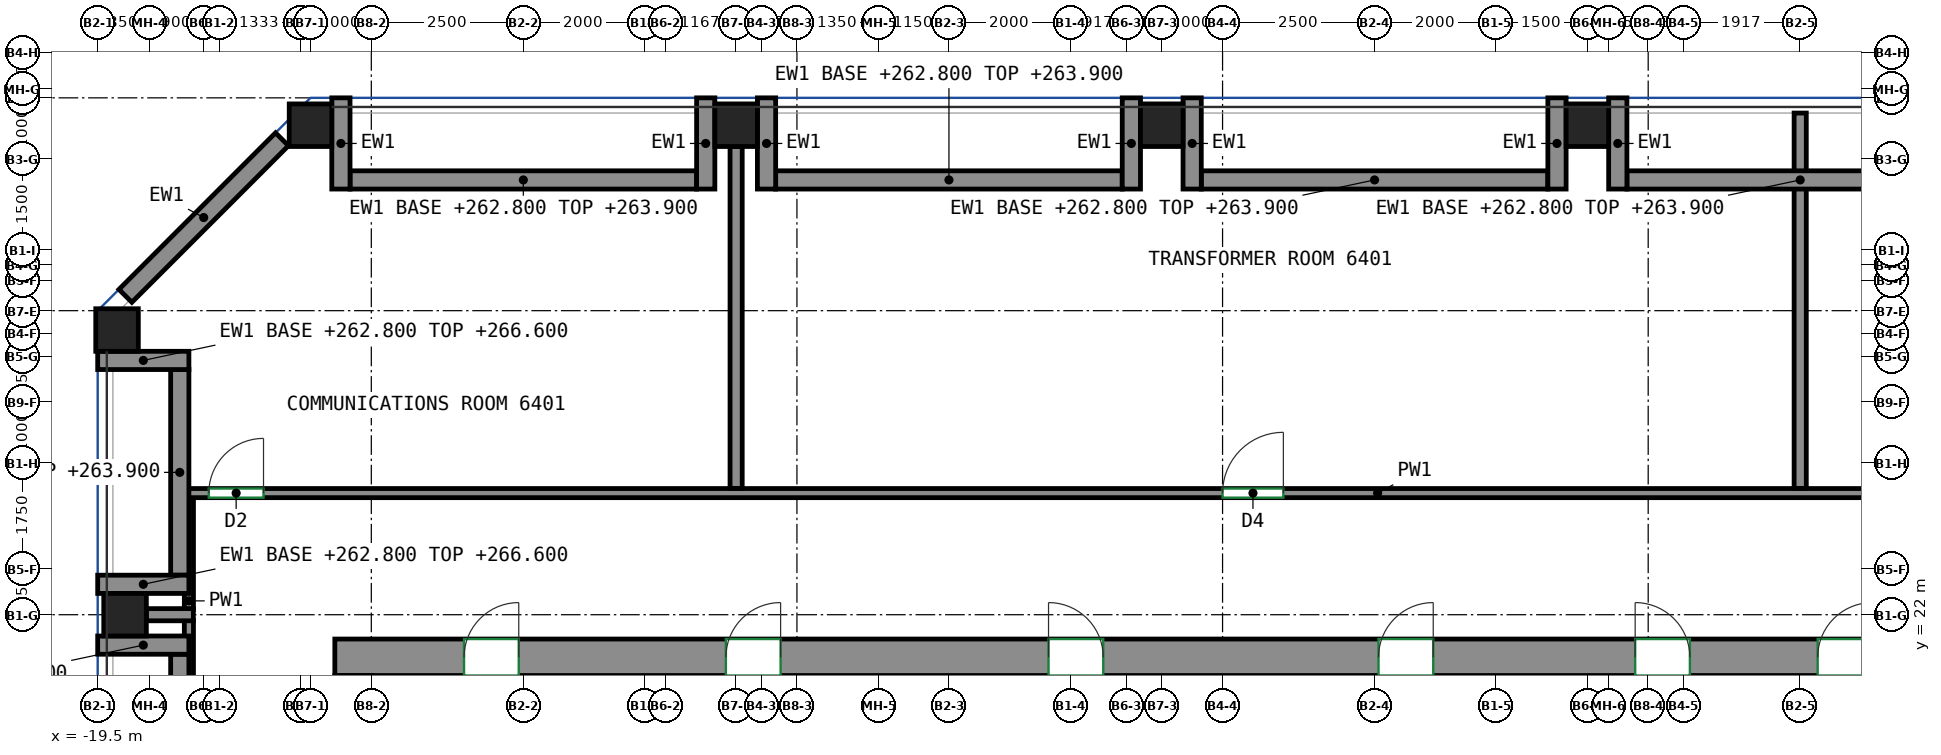
"""IFC4 building model, lengths in metres.
Left out: names, types, materials, properties, quantities, classifications, styles, units other than length and angle.
Written with IfcOpenShell. Run it as: python <this file> out.ifc"""

import sys

from ifc_helpers import new_model, si_unit, direction, frame, frame_2d, origin, origin_2d, place, context, subcontext, project, spatial, rectangle, extrude, source, transform, mapped, element, fill, save


model = new_model("IFC4")
c1 = context("Model", 3, precision=1e-05, world=origin(), true_north=direction((0.0, 1.0)))
c2 = subcontext(c1, "Body", "Model", "MODEL_VIEW")
j1 = project(units=[si_unit("LENGTHUNIT", "METRE"), si_unit("PLANEANGLEUNIT", "RADIAN")], contexts=[c1])
p1 = place(None, origin())
s1 = spatial("IfcSite", under=j1, at=p1, CompositionType="ELEMENT")
p2 = place(p1, origin())
s2 = spatial("IfcBuilding", under=s1, at=p2, CompositionType="ELEMENT")
p3 = place(p2, frame((0.0, 0.0, 262.8)))
s3 = spatial("IfcBuildingStorey", under=s2, at=p3, CompositionType="ELEMENT", Elevation=262.8)
m1 = source(origin(), c2, "Body", "SweptSolid", [
    extrude(rectangle(XDim=0.7, YDim=0.7, at=origin_2d()), origin(), (0.0, 0.0, 1.0), 3.8),
])
for number, where, z_axis, x_axis in (
    (1, (-19.182, 26.682, 0.0), (0.0, 0.0, 1.0), (1.0, 0.0, 0.0)),
    (2, (-19.05, 22.0, 0.0), (0.0, 0.0, 1.0), (1.0, 0.0, 0.0)),
):
    element("IfcColumn", number, at=place(p3, frame(where, z_axis=z_axis, x_axis=x_axis)), inside=s3, PredefinedType="COLUMN", context=c2, shape_type="MappedRepresentation", body=[
        mapped(m1, transform((0.0, 0.0, 0.0))),
    ])
m2 = source(origin(), c2, "Body", "SweptSolid", [
    extrude(rectangle(XDim=0.7, YDim=0.7, at=origin_2d()), origin(), (0.0, 0.0, 1.0), 2.3),
])
for number, where, z_axis, x_axis in (
    (3, (-16.0, 30.05, 0.0), (0.0, 0.0, 1.0), (1.0, 0.0, 0.0)),
    (4, (-9.0, 30.05, 0.0), (0.0, 0.0, 1.0), (1.0, 0.0, 0.0)),
    (5, (-2.0, 30.05, 0.0), (0.0, 0.0, 1.0), (1.0, 0.0, 0.0)),
    (6, (5.0, 30.05, 0.0), (0.0, 0.0, 1.0), (1.0, 0.0, 0.0)),
):
    element("IfcColumn", number, at=place(p3, frame(where, z_axis=z_axis, x_axis=x_axis)), inside=s3, PredefinedType="COLUMN", context=c2, shape_type="MappedRepresentation", body=[
        mapped(m2, transform((0.0, 0.0, 0.0))),
    ])
m3 = source(origin(), c2, "Body", "SweptSolid", [
    extrude(rectangle(XDim=33.3, YDim=0.6, at=frame_2d((16.65, 0.0))), origin(), (0.0, 0.0, 1.0), 3.8),
])
p4 = place(p3, frame((-15.6, 21.3, 0.0), z_axis=(0.0, 0.0, 1.0), x_axis=(1.0, 0.0, 0.0)))
e7 = element("IfcWall", 7, at=p4, inside=s3, PredefinedType="SHEAR", context=c2, shape_type="MappedRepresentation", body=[
    mapped(m3, transform((0.0, 0.0, 0.0))),
])
p5 = place(p4, frame((6.431, 0.0, 0.0)))
e8 = element("IfcOpeningElement", 8, at=p5, cuts=e7, PredefinedType="OPENING", context=c2, shape_type="SweptSolid", body=[
    extrude(rectangle(XDim=0.9, YDim=2.1, at=frame_2d((0.45, 1.05))), frame((0.0, 0.31, 0.0), z_axis=(0.0, -1.0, 0.0), x_axis=(1.0, 0.0, 0.0)), (0.0, 0.0, 1.0), 0.62),
])
p6 = place(p4, frame((11.738, 0.0, 0.0)))
e9 = element("IfcOpeningElement", 9, at=p6, cuts=e7, PredefinedType="OPENING", context=c2, shape_type="SweptSolid", body=[
    extrude(rectangle(XDim=0.9, YDim=2.1, at=frame_2d((0.45, 1.05))), frame((0.0, 0.31, 0.0), z_axis=(0.0, -1.0, 0.0), x_axis=(1.0, 0.0, 0.0)), (0.0, 0.0, 1.0), 0.62),
])
p7 = place(p4, frame((17.165, 0.0, 0.0)))
e10 = element("IfcOpeningElement", 10, at=p7, cuts=e7, PredefinedType="OPENING", context=c2, shape_type="SweptSolid", body=[
    extrude(rectangle(XDim=0.9, YDim=2.1, at=frame_2d((0.45, 1.05))), frame((0.0, 0.31, 0.0), z_axis=(0.0, -1.0, 0.0), x_axis=(1.0, 0.0, 0.0)), (0.0, 0.0, 1.0), 0.62),
])
p8 = place(p4, frame((21.386, 0.0, 0.0)))
e11 = element("IfcOpeningElement", 11, at=p8, cuts=e7, PredefinedType="OPENING", context=c2, shape_type="SweptSolid", body=[
    extrude(rectangle(XDim=0.9, YDim=2.1, at=frame_2d((0.45, 1.05))), frame((0.0, 0.31, 0.0), z_axis=(0.0, -1.0, 0.0), x_axis=(1.0, 0.0, 0.0)), (0.0, 0.0, 1.0), 0.62),
])
p9 = place(p4, frame((24.387, 0.0, 0.0)))
e12 = element("IfcOpeningElement", 12, at=p9, cuts=e7, PredefinedType="OPENING", context=c2, shape_type="SweptSolid", body=[
    extrude(rectangle(XDim=0.9, YDim=2.1, at=frame_2d((0.45, 1.05))), frame((0.0, 0.31, 0.0), z_axis=(0.0, -1.0, 0.0), x_axis=(1.0, 0.0, 0.0)), (0.0, 0.0, 1.0), 0.62),
])
p10 = place(p4, frame((26.92, 0.0, 0.0)))
e13 = element("IfcOpeningElement", 13, at=p10, cuts=e7, PredefinedType="OPENING", context=c2, shape_type="SweptSolid", body=[
    extrude(rectangle(XDim=0.9, YDim=2.1, at=frame_2d((0.45, 1.05))), frame((0.0, 0.31, 0.0), z_axis=(0.0, -1.0, 0.0), x_axis=(1.0, 0.0, 0.0)), (0.0, 0.0, 1.0), 0.62),
])
p11 = place(p4, frame((2.125, 0.0, 0.0)))
e14 = element("IfcOpeningElement", 14, at=p11, cuts=e7, PredefinedType="OPENING", context=c2, shape_type="SweptSolid", body=[
    extrude(rectangle(XDim=0.9, YDim=2.1, at=frame_2d((0.45, 1.05))), frame((0.0, 0.31, 0.0), z_axis=(0.0, -1.0, 0.0), x_axis=(1.0, 0.0, 0.0)), (0.0, 0.0, 1.0), 0.62),
])
p12 = place(p4, frame((30.275, 0.0, 0.0)))
e15 = element("IfcOpeningElement", 15, at=p12, cuts=e7, PredefinedType="OPENING", context=c2, shape_type="SweptSolid", body=[
    extrude(rectangle(XDim=0.9, YDim=2.1, at=frame_2d((0.45, 1.05))), frame((0.0, 0.31, 0.0), z_axis=(0.0, -1.0, 0.0), x_axis=(1.0, 0.0, 0.0)), (0.0, 0.0, 1.0), 0.62),
])
m4 = source(origin(), c2, "Body", "SweptSolid", [
    extrude(rectangle(XDim=5.7, YDim=0.3, at=frame_2d((2.85, 0.0))), origin(), (0.0, 0.0, 1.0), 1.1),
])
p13 = place(p3, frame((11.35, 29.15, 0.0), z_axis=(0.0, 0.0, 1.0), x_axis=(-1.0, 0.0, 0.0)))
e16 = element("IfcWall", 16, at=p13, inside=s3, PredefinedType="SOLIDWALL", context=c2, shape_type="MappedRepresentation", body=[
    mapped(m4, transform((0.0, 0.0, 0.0))),
])
m5 = source(origin(), c2, "Body", "SweptSolid", [
    extrude(rectangle(XDim=1.5, YDim=0.3, at=frame_2d((0.75, 0.0))), origin(), (0.0, 0.0, 1.0), 2.3),
])
p14 = place(p3, frame((5.5, 30.5, 0.0), z_axis=(0.0, 0.0, 1.0), x_axis=(0.0, -1.0, 0.0)))
e17 = element("IfcWall", 17, at=p14, inside=s3, PredefinedType="SOLIDWALL", context=c2, shape_type="MappedRepresentation", body=[
    mapped(m5, transform((0.0, 0.0, 0.0))),
])
p15 = place(p3, frame((4.35, 29.15, 0.0), z_axis=(0.0, 0.0, 1.0), x_axis=(-1.0, 0.0, 0.0)))
e18 = element("IfcWall", 18, at=p15, inside=s3, PredefinedType="SOLIDWALL", context=c2, shape_type="MappedRepresentation", body=[
    mapped(m4, transform((0.0, 0.0, 0.0))),
])
for number, where, z_axis, x_axis in (
    (19, (4.5, 30.5, 0.0), (0.0, 0.0, 1.0), (0.0, -1.0, 0.0)),
    (20, (-1.5, 30.5, 0.0), (0.0, 0.0, 1.0), (0.0, -1.0, 0.0)),
):
    element("IfcWall", number, at=place(p3, frame(where, z_axis=z_axis, x_axis=x_axis)), inside=s3, PredefinedType="SOLIDWALL", context=c2, shape_type="MappedRepresentation", body=[
        mapped(m5, transform((0.0, 0.0, 0.0))),
    ])
p16 = place(p3, frame((-2.65, 29.15, 0.0), z_axis=(0.0, 0.0, 1.0), x_axis=(-1.0, 0.0, 0.0)))
e21 = element("IfcWall", 21, at=p16, inside=s3, PredefinedType="SOLIDWALL", context=c2, shape_type="MappedRepresentation", body=[
    mapped(m4, transform((0.0, 0.0, 0.0))),
])
for number, where, z_axis, x_axis in (
    (22, (-2.5, 30.5, 0.0), (0.0, 0.0, 1.0), (0.0, -1.0, 0.0)),
    (23, (-8.5, 30.5, 0.0), (0.0, 0.0, 1.0), (0.0, -1.0, 0.0)),
):
    element("IfcWall", number, at=place(p3, frame(where, z_axis=z_axis, x_axis=x_axis)), inside=s3, PredefinedType="SOLIDWALL", context=c2, shape_type="MappedRepresentation", body=[
        mapped(m5, transform((0.0, 0.0, 0.0))),
    ])
p17 = place(p3, frame((-9.65, 29.15, 0.0), z_axis=(0.0, 0.0, 1.0), x_axis=(-1.0, 0.0, 0.0)))
e24 = element("IfcWall", 24, at=p17, inside=s3, PredefinedType="SOLIDWALL", context=c2, shape_type="MappedRepresentation", body=[
    mapped(m4, transform((0.0, 0.0, 0.0))),
])
for number, where, z_axis, x_axis in (
    (25, (-9.5, 30.5, 0.0), (0.0, 0.0, 1.0), (0.0, -1.0, 0.0)),
    (26, (-15.5, 30.5, 0.0), (0.0, 0.0, 1.0), (0.0, -1.0, 0.0)),
):
    element("IfcWall", number, at=place(p3, frame(where, z_axis=z_axis, x_axis=x_axis)), inside=s3, PredefinedType="SOLIDWALL", context=c2, shape_type="MappedRepresentation", body=[
        mapped(m5, transform((0.0, 0.0, 0.0))),
    ])
m6 = source(origin(), c2, "Body", "SweptSolid", [
    extrude(rectangle(XDim=3.642, YDim=0.3, at=frame_2d((1.821, 0.0))), origin(), (0.0, 0.0, 1.0), 2.3),
])
p18 = place(p3, frame((-16.469, 29.819, 0.0), z_axis=(0.0, 0.0, 1.0), x_axis=(-0.707106781187, -0.707106781187, 0.0)))
e27 = element("IfcWall", 27, at=p18, inside=s3, PredefinedType="SOLIDWALL", context=c2, shape_type="MappedRepresentation", body=[
    mapped(m6, transform((0.0, 0.0, 0.0))),
])
m7 = source(origin(), c2, "Body", "SweptSolid", [
    extrude(rectangle(XDim=3.382, YDim=0.3, at=frame_2d((1.691, 0.0))), origin(), (0.0, 0.0, 1.0), 1.1),
])
p19 = place(p3, frame((-18.15, 26.032, 0.0), z_axis=(0.0, 0.0, 1.0), x_axis=(0.0, -1.0, 0.0)))
e28 = element("IfcWall", 28, at=p19, inside=s3, PredefinedType="SOLIDWALL", context=c2, shape_type="MappedRepresentation", body=[
    mapped(m7, transform((0.0, 0.0, 0.0))),
])
m8 = source(origin(), c2, "Body", "SweptSolid", [
    extrude(rectangle(XDim=1.5, YDim=0.3, at=frame_2d((0.75, 0.0))), origin(), (0.0, 0.0, 1.0), 3.8),
])
for number, where, z_axis, x_axis in (
    (29, (-19.5, 26.182, 0.0), (0.0, 0.0, 1.0), (1.0, 0.0, 0.0)),
    (30, (-19.5, 22.5, 0.0), (0.0, 0.0, 1.0), (1.0, 0.0, 0.0)),
):
    element("IfcWall", number, at=place(p3, frame(where, z_axis=z_axis, x_axis=x_axis)), inside=s3, PredefinedType="SOLIDWALL", context=c2, shape_type="MappedRepresentation", body=[
        mapped(m8, transform((0.0, 0.0, 0.0))),
    ])
m9 = source(origin(), c2, "Body", "SweptSolid", [
    extrude(rectangle(XDim=12.7, YDim=0.3, at=frame_2d((6.35, 0.0))), origin(), (0.0, 0.0, 1.0), 1.1),
])
p20 = place(p3, frame((-18.15, 21.35, 0.0), z_axis=(0.0, 0.0, 1.0), x_axis=(0.0, -1.0, 0.0)))
e31 = element("IfcWall", 31, at=p20, inside=s3, PredefinedType="SOLIDWALL", context=c2, shape_type="MappedRepresentation", body=[
    mapped(m9, transform((0.0, 0.0, 0.0))),
])
p21 = place(p3, frame((-19.5, 21.5, 0.0), z_axis=(0.0, 0.0, 1.0), x_axis=(1.0, 0.0, 0.0)))
e32 = element("IfcWall", 32, at=p21, inside=s3, PredefinedType="SOLIDWALL", context=c2, shape_type="MappedRepresentation", body=[
    mapped(m8, transform((0.0, 0.0, 0.0))),
])
p22 = place(p3, frame((-18.0, 22.09, 0.0), z_axis=(0.0, 0.0, 1.0), x_axis=(0.0, 1.0, 0.0)))
e33 = element("IfcWall", 33, at=p22, inside=s3, PredefinedType="PARTITIONING", context=c2, shape_type="SweptSolid", body=[
    extrude(rectangle(XDim=1.835, YDim=0.15, at=frame_2d((0.917, 0.0))), origin(), (0.0, 0.0, 1.0), 3.8),
])
p23 = place(p3, frame((-18.075, 24.0, 0.0), z_axis=(0.0, 0.0, 1.0), x_axis=(1.0, 0.0, 0.0)))
e34 = element("IfcWall", 34, at=p23, inside=s3, PredefinedType="PARTITIONING", context=c2, shape_type="SweptSolid", body=[
    extrude(rectangle(XDim=39.25, YDim=0.15, at=frame_2d((19.625, 0.0))), origin(), (0.0, 0.0, 1.0), 3.8),
])
p24 = place(p23, frame((0.402, 0.0, 0.0)))
e35 = element("IfcOpeningElement", 35, at=p24, cuts=e34, PredefinedType="OPENING", context=c2, shape_type="SweptSolid", body=[
    extrude(rectangle(XDim=0.9, YDim=2.1, at=frame_2d((0.45, 1.05))), frame((0.0, 0.085, 0.0), z_axis=(0.0, -1.0, 0.0), x_axis=(1.0, 0.0, 0.0)), (0.0, 0.0, 1.0), 0.17),
])
p25 = place(p23, frame((17.075, 0.0, 0.0)))
e36 = element("IfcOpeningElement", 36, at=p25, cuts=e34, PredefinedType="OPENING", context=c2, shape_type="SweptSolid", body=[
    extrude(rectangle(XDim=1.0, YDim=2.1, at=frame_2d((0.5, 1.05))), frame((0.0, 0.085, 0.0), z_axis=(0.0, -1.0, 0.0), x_axis=(1.0, 0.0, 0.0)), (0.0, 0.0, 1.0), 0.17),
])
p26 = place(p23, frame((28.78, 0.0, 0.0)))
e37 = element("IfcOpeningElement", 37, at=p26, cuts=e34, PredefinedType="OPENING", context=c2, shape_type="SweptSolid", body=[
    extrude(rectangle(XDim=1.0, YDim=2.1, at=frame_2d((0.5, 1.05))), frame((0.0, 0.085, 0.0), z_axis=(0.0, -1.0, 0.0), x_axis=(1.0, 0.0, 0.0)), (0.0, 0.0, 1.0), 0.17),
])
p27 = place(p3, frame((-18.0, 8.09, 0.0), z_axis=(0.0, 0.0, 1.0), x_axis=(0.0, 1.0, 0.0)))
e38 = element("IfcWall", 38, at=p27, inside=s3, PredefinedType="PARTITIONING", context=c2, shape_type="SweptSolid", body=[
    extrude(rectangle(XDim=13.82, YDim=0.15, at=frame_2d((6.91, 0.0))), origin(), (0.0, 0.0, 1.0), 3.8),
])
p28 = place(p27, frame((11.017, 0.0, 0.0)))
e39 = element("IfcOpeningElement", 39, at=p28, cuts=e38, PredefinedType="OPENING", context=c2, shape_type="SweptSolid", body=[
    extrude(rectangle(XDim=0.9, YDim=2.1, at=frame_2d((0.45, 1.05))), frame((0.0, 0.085, 0.0), z_axis=(0.0, -1.0, 0.0), x_axis=(1.0, 0.0, 0.0)), (0.0, 0.0, 1.0), 0.17),
])
p29 = place(p3, frame((8.5, 24.077, 0.0), z_axis=(0.0, 0.0, 1.0), x_axis=(0.0, 1.0, 0.0)))
e40 = element("IfcWall", 40, at=p29, inside=s3, PredefinedType="PARTITIONING", context=c2, shape_type="SweptSolid", body=[
    extrude(rectangle(XDim=4.953, YDim=0.2, at=frame_2d((2.477, 0.0))), origin(), (0.0, 0.0, 1.0), 3.8),
])
p30 = place(p3, frame((8.5, 29.27, 0.0), z_axis=(0.0, 0.0, 1.0), x_axis=(0.0, 1.0, 0.0)))
e41 = element("IfcWall", 41, at=p30, inside=s3, PredefinedType="PARTITIONING", context=c2, shape_type="SweptSolid", body=[
    extrude(rectangle(XDim=0.98, YDim=0.2, at=frame_2d((0.49, 0.0))), origin(), (0.0, 0.0, 1.0), 3.8),
])
p31 = place(p3, frame((-9.0, 29.7, 0.0), z_axis=(0.0, 0.0, 1.0), x_axis=(0.0, -1.0, 0.0)))
e42 = element("IfcWall", 42, at=p31, inside=s3, PredefinedType="PARTITIONING", context=c2, shape_type="SweptSolid", body=[
    extrude(rectangle(XDim=5.623, YDim=0.2, at=frame_2d((2.812, 0.0))), origin(), (0.0, 0.0, 1.0), 3.8),
])
p32 = place(p3, frame((-18.7, 22.0, 0.0), z_axis=(0.0, 0.0, 1.0), x_axis=(1.0, 0.0, 0.0)))
e43 = element("IfcWall", 43, at=p32, inside=s3, PredefinedType="PARTITIONING", context=c2, shape_type="SweptSolid", body=[
    extrude(rectangle(XDim=0.773, YDim=0.2, at=frame_2d((0.386, 0.0))), origin(), (0.0, 0.0, 1.0), 3.8),
])
p33 = place(p5, origin())
e44 = element("IfcDoor", 44, at=p33, inside=s3, OperationType="SINGLE_SWING_RIGHT", PredefinedType="DOOR", context=c2, shape_type="SweptSolid", body=[
    extrude(rectangle(XDim=0.9, YDim=2.1, at=frame_2d((0.45, 1.05))), frame((0.0, -0.155, 0.0), z_axis=(0.0, -1.0, 0.0), x_axis=(1.0, 0.0, 0.0)), (0.0, 0.0, 1.0), 0.05),
])
fill(e8, e44)
p34 = place(p6, origin())
e45 = element("IfcDoor", 45, at=p34, inside=s3, OperationType="SINGLE_SWING_LEFT", PredefinedType="DOOR", context=c2, shape_type="SweptSolid", body=[
    extrude(rectangle(XDim=0.9, YDim=2.1, at=frame_2d((0.45, 1.05))), frame((0.0, -0.155, 0.0), z_axis=(0.0, -1.0, 0.0), x_axis=(1.0, 0.0, 0.0)), (0.0, 0.0, 1.0), 0.05),
])
fill(e9, e45)
p35 = place(p7, origin())
e46 = element("IfcDoor", 46, at=p35, inside=s3, OperationType="SINGLE_SWING_RIGHT", PredefinedType="DOOR", context=c2, shape_type="SweptSolid", body=[
    extrude(rectangle(XDim=0.9, YDim=2.1, at=frame_2d((0.45, 1.05))), frame((0.0, -0.155, 0.0), z_axis=(0.0, -1.0, 0.0), x_axis=(1.0, 0.0, 0.0)), (0.0, 0.0, 1.0), 0.05),
])
fill(e10, e46)
p36 = place(p8, origin())
e47 = element("IfcDoor", 47, at=p36, inside=s3, OperationType="SINGLE_SWING_LEFT", PredefinedType="DOOR", context=c2, shape_type="SweptSolid", body=[
    extrude(rectangle(XDim=0.9, YDim=2.1, at=frame_2d((0.45, 1.05))), frame((0.0, -0.155, 0.0), z_axis=(0.0, -1.0, 0.0), x_axis=(1.0, 0.0, 0.0)), (0.0, 0.0, 1.0), 0.05),
])
fill(e11, e47)
p37 = place(p9, origin())
e48 = element("IfcDoor", 48, at=p37, inside=s3, OperationType="SINGLE_SWING_RIGHT", PredefinedType="DOOR", context=c2, shape_type="SweptSolid", body=[
    extrude(rectangle(XDim=0.9, YDim=2.1, at=frame_2d((0.45, 1.05))), frame((0.0, -0.155, 0.0), z_axis=(0.0, -1.0, 0.0), x_axis=(1.0, 0.0, 0.0)), (0.0, 0.0, 1.0), 0.05),
])
fill(e12, e48)
p38 = place(p11, origin())
e49 = element("IfcDoor", 49, at=p38, inside=s3, OperationType="SINGLE_SWING_RIGHT", PredefinedType="DOOR", context=c2, shape_type="SweptSolid", body=[
    extrude(rectangle(XDim=0.9, YDim=2.1, at=frame_2d((0.45, 1.05))), frame((0.0, -0.155, 0.0), z_axis=(0.0, -1.0, 0.0), x_axis=(1.0, 0.0, 0.0)), (0.0, 0.0, 1.0), 0.05),
])
fill(e14, e49)
p39 = place(p24, origin())
e50 = element("IfcDoor", 50, at=p39, inside=s3, OperationType="SINGLE_SWING_RIGHT", PredefinedType="DOOR", context=c2, shape_type="SweptSolid", body=[
    extrude(rectangle(XDim=0.9, YDim=2.1, at=frame_2d((0.45, 1.05))), frame((0.0, 0.025, 0.0), z_axis=(0.0, -1.0, 0.0), x_axis=(1.0, 0.0, 0.0)), (0.0, 0.0, 1.0), 0.05),
])
fill(e35, e50)
p40 = place(p25, origin())
e51 = element("IfcDoor", 51, at=p40, inside=s3, OperationType="SINGLE_SWING_RIGHT", PredefinedType="DOOR", context=c2, shape_type="SweptSolid", body=[
    extrude(rectangle(XDim=1.0, YDim=2.1, at=frame_2d((0.5, 1.05))), frame((0.0, 0.025, 0.0), z_axis=(0.0, -1.0, 0.0), x_axis=(1.0, 0.0, 0.0)), (0.0, 0.0, 1.0), 0.05),
])
fill(e36, e51)
save(model, sys.argv[1])
